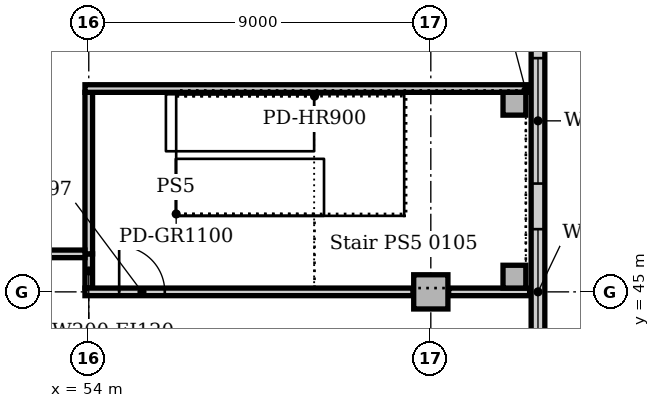
"""IFC4 building model, lengths in metres.
Left out: names, types, materials, properties, quantities, classifications, styles, units other than length and angle.
Written with IfcOpenShell. Run it as: python <this file> out.ifc"""

import sys

from ifc_helpers import new_model, si_unit, direction, frame, frame_2d, origin, origin_2d, place, context, subcontext, project, spatial, rectangle, extrude, element, fill, save


model = new_model("IFC4")
c1 = context("Model", 3, precision=1e-05, world=origin(), true_north=direction((0.0, 1.0)))
c2 = subcontext(c1, "Body", "Model", "MODEL_VIEW")
j1 = project(units=[si_unit("LENGTHUNIT", "METRE"), si_unit("PLANEANGLEUNIT", "RADIAN")], contexts=[c1])
p1 = place(None, origin())
s1 = spatial("IfcSite", under=j1, at=p1, CompositionType="ELEMENT")
p2 = place(p1, origin())
s2 = spatial("IfcBuilding", under=s1, at=p2, CompositionType="ELEMENT")
p3 = place(p2, frame((0.0, 0.0, 6.0)))
s3 = spatial("IfcBuildingStorey", under=s2, at=p3, CompositionType="ELEMENT", Elevation=6.0)
p4 = place(p3, frame((63.0, 45.0, 0.0), z_axis=(0.0, 0.0, 1.0), x_axis=(1.0, 0.0, 0.0)))
e1 = element("IfcColumn", 1, at=p4, inside=s3, PredefinedType="COLUMN", context=c2, shape_type="SweptSolid", body=[
    extrude(rectangle(XDim=0.9, YDim=0.9, at=origin_2d()), origin(), (0.0, 0.0, 1.0), 4.7),
])
p5 = place(p3, frame((65.82, -9.0, 0.0), z_axis=(0.0, 0.0, 1.0), x_axis=(0.0, 1.0, 0.0)))
e2 = element("IfcWall", 2, at=p5, inside=s3, PredefinedType="STANDARD", context=c2, shape_type="SweptSolid", body=[
    extrude(rectangle(XDim=63.0, YDim=0.36, at=frame_2d((31.5, 0.0))), origin(), (0.0, 0.0, 1.0), 4.7),
])
p6 = place(p5, frame((2.85, 0.0, 0.9)))
e3 = element("IfcOpeningElement", 3, at=p6, cuts=e2, PredefinedType="OPENING", context=c2, shape_type="SweptSolid", body=[
    extrude(rectangle(XDim=3.3, YDim=2.4, at=frame_2d((1.65, 1.2))), frame((0.0, 0.19, 0.0), z_axis=(0.0, -1.0, 0.0), x_axis=(1.0, 0.0, 0.0)), (0.0, 0.0, 1.0), 0.38),
])
p7 = place(p5, frame((7.35, 0.0, 0.9)))
e4 = element("IfcOpeningElement", 4, at=p7, cuts=e2, PredefinedType="OPENING", context=c2, shape_type="SweptSolid", body=[
    extrude(rectangle(XDim=3.3, YDim=2.4, at=frame_2d((1.65, 1.2))), frame((0.0, 0.19, 0.0), z_axis=(0.0, -1.0, 0.0), x_axis=(1.0, 0.0, 0.0)), (0.0, 0.0, 1.0), 0.38),
])
p8 = place(p5, frame((11.85, 0.0, 0.9)))
e5 = element("IfcOpeningElement", 5, at=p8, cuts=e2, PredefinedType="OPENING", context=c2, shape_type="SweptSolid", body=[
    extrude(rectangle(XDim=3.3, YDim=2.4, at=frame_2d((1.65, 1.2))), frame((0.0, 0.19, 0.0), z_axis=(0.0, -1.0, 0.0), x_axis=(1.0, 0.0, 0.0)), (0.0, 0.0, 1.0), 0.38),
])
p9 = place(p5, frame((16.35, 0.0, 0.9)))
e6 = element("IfcOpeningElement", 6, at=p9, cuts=e2, PredefinedType="OPENING", context=c2, shape_type="SweptSolid", body=[
    extrude(rectangle(XDim=3.3, YDim=2.4, at=frame_2d((1.65, 1.2))), frame((0.0, 0.19, 0.0), z_axis=(0.0, -1.0, 0.0), x_axis=(1.0, 0.0, 0.0)), (0.0, 0.0, 1.0), 0.38),
])
p10 = place(p5, frame((20.85, 0.0, 0.9)))
e7 = element("IfcOpeningElement", 7, at=p10, cuts=e2, PredefinedType="OPENING", context=c2, shape_type="SweptSolid", body=[
    extrude(rectangle(XDim=3.3, YDim=2.4, at=frame_2d((1.65, 1.2))), frame((0.0, 0.19, 0.0), z_axis=(0.0, -1.0, 0.0), x_axis=(1.0, 0.0, 0.0)), (0.0, 0.0, 1.0), 0.38),
])
p11 = place(p5, frame((25.35, 0.0, 0.9)))
e8 = element("IfcOpeningElement", 8, at=p11, cuts=e2, PredefinedType="OPENING", context=c2, shape_type="SweptSolid", body=[
    extrude(rectangle(XDim=3.3, YDim=2.4, at=frame_2d((1.65, 1.2))), frame((0.0, 0.19, 0.0), z_axis=(0.0, -1.0, 0.0), x_axis=(1.0, 0.0, 0.0)), (0.0, 0.0, 1.0), 0.38),
])
p12 = place(p5, frame((29.85, 0.0, 0.9)))
e9 = element("IfcOpeningElement", 9, at=p12, cuts=e2, PredefinedType="OPENING", context=c2, shape_type="SweptSolid", body=[
    extrude(rectangle(XDim=3.3, YDim=2.4, at=frame_2d((1.65, 1.2))), frame((0.0, 0.19, 0.0), z_axis=(0.0, -1.0, 0.0), x_axis=(1.0, 0.0, 0.0)), (0.0, 0.0, 1.0), 0.38),
])
p13 = place(p5, frame((34.35, 0.0, 0.9)))
e10 = element("IfcOpeningElement", 10, at=p13, cuts=e2, PredefinedType="OPENING", context=c2, shape_type="SweptSolid", body=[
    extrude(rectangle(XDim=3.3, YDim=2.4, at=frame_2d((1.65, 1.2))), frame((0.0, 0.19, 0.0), z_axis=(0.0, -1.0, 0.0), x_axis=(1.0, 0.0, 0.0)), (0.0, 0.0, 1.0), 0.38),
])
p14 = place(p5, frame((38.85, 0.0, 0.9)))
e11 = element("IfcOpeningElement", 11, at=p14, cuts=e2, PredefinedType="OPENING", context=c2, shape_type="SweptSolid", body=[
    extrude(rectangle(XDim=3.3, YDim=2.4, at=frame_2d((1.65, 1.2))), frame((0.0, 0.19, 0.0), z_axis=(0.0, -1.0, 0.0), x_axis=(1.0, 0.0, 0.0)), (0.0, 0.0, 1.0), 0.38),
])
p15 = place(p5, frame((43.35, 0.0, 0.9)))
e12 = element("IfcOpeningElement", 12, at=p15, cuts=e2, PredefinedType="OPENING", context=c2, shape_type="SweptSolid", body=[
    extrude(rectangle(XDim=3.3, YDim=2.4, at=frame_2d((1.65, 1.2))), frame((0.0, 0.19, 0.0), z_axis=(0.0, -1.0, 0.0), x_axis=(1.0, 0.0, 0.0)), (0.0, 0.0, 1.0), 0.38),
])
p16 = place(p5, frame((47.85, 0.0, 0.9)))
e13 = element("IfcOpeningElement", 13, at=p16, cuts=e2, PredefinedType="OPENING", context=c2, shape_type="SweptSolid", body=[
    extrude(rectangle(XDim=3.3, YDim=2.4, at=frame_2d((1.65, 1.2))), frame((0.0, 0.19, 0.0), z_axis=(0.0, -1.0, 0.0), x_axis=(1.0, 0.0, 0.0)), (0.0, 0.0, 1.0), 0.38),
])
p17 = place(p5, frame((52.35, 0.0, 0.9)))
e14 = element("IfcOpeningElement", 14, at=p17, cuts=e2, PredefinedType="OPENING", context=c2, shape_type="SweptSolid", body=[
    extrude(rectangle(XDim=3.3, YDim=2.4, at=frame_2d((1.65, 1.2))), frame((0.0, 0.19, 0.0), z_axis=(0.0, -1.0, 0.0), x_axis=(1.0, 0.0, 0.0)), (0.0, 0.0, 1.0), 0.38),
])
p18 = place(p5, frame((56.85, 0.0, 0.9)))
e15 = element("IfcOpeningElement", 15, at=p18, cuts=e2, PredefinedType="OPENING", context=c2, shape_type="SweptSolid", body=[
    extrude(rectangle(XDim=3.3, YDim=2.4, at=frame_2d((1.65, 1.2))), frame((0.0, 0.19, 0.0), z_axis=(0.0, -1.0, 0.0), x_axis=(1.0, 0.0, 0.0)), (0.0, 0.0, 1.0), 0.38),
])
for number, where, z_axis, x_axis in (
    (16, (65.2, 49.95, 0.0), (0.0, 0.0, 1.0), (1.0, 0.0, 0.0)),
    (17, (65.2, 45.4, 0.0), (0.0, 0.0, 1.0), (1.0, 0.0, 0.0)),
):
    element("IfcColumn", number, at=place(p3, frame(where, z_axis=z_axis, x_axis=x_axis)), inside=s3, PredefinedType="COLUMN", context=c2, shape_type="SweptSolid", body=[
        extrude(rectangle(XDim=0.6, YDim=0.6, at=origin_2d()), origin(), (0.0, 0.0, 1.0), 5.0),
    ])
p19 = place(p3, frame((54.0, 45.1, 0.0), z_axis=(0.0, 0.0, 1.0), x_axis=(0.0, 1.0, 0.0)))
e18 = element("IfcWall", 18, at=p19, inside=s3, PredefinedType="SOLIDWALL", context=c2, shape_type="SweptSolid", body=[
    extrude(rectangle(XDim=0.9, YDim=0.2, at=frame_2d((0.45, 0.0))), origin(), (0.0, 0.0, 1.0), 4.7),
])
p20 = place(p3, frame((53.9, 45.0, 0.0), z_axis=(0.0, 0.0, 1.0), x_axis=(1.0, 0.0, 0.0)))
e19 = element("IfcWall", 19, at=p20, inside=s3, PredefinedType="SOLIDWALL", context=c2, shape_type="SweptSolid", body=[
    extrude(rectangle(XDim=8.63, YDim=0.2, at=frame_2d((4.315, 0.0))), origin(), (0.0, 0.0, 1.0), 4.7),
])
p21 = place(p20, frame((0.9, 0.0, 0.0)))
e20 = element("IfcOpeningElement", 20, at=p21, cuts=e19, PredefinedType="OPENING", context=c2, shape_type="SweptSolid", body=[
    extrude(rectangle(XDim=1.2, YDim=2.1, at=frame_2d((0.6, 1.05))), frame((0.0, 0.11, 0.0), z_axis=(0.0, -1.0, 0.0), x_axis=(1.0, 0.0, 0.0)), (0.0, 0.0, 1.0), 0.22),
])
p22 = place(p3, frame((63.47, 45.0, 0.0), z_axis=(0.0, 0.0, 1.0), x_axis=(1.0, 0.0, 0.0)))
e21 = element("IfcWall", 21, at=p22, inside=s3, PredefinedType="SOLIDWALL", context=c2, shape_type="SweptSolid", body=[
    extrude(rectangle(XDim=2.13, YDim=0.2, at=frame_2d((1.065, 0.0))), origin(), (0.0, 0.0, 1.0), 4.7),
])
p23 = place(p3, frame((54.0, 46.0, 0.0), z_axis=(0.0, 0.0, 1.0), x_axis=(0.0, 1.0, 0.0)))
e22 = element("IfcWall", 22, at=p23, inside=s3, PredefinedType="SOLIDWALL", context=c2, shape_type="SweptSolid", body=[
    extrude(rectangle(XDim=4.25, YDim=0.2, at=frame_2d((2.125, 0.0))), origin(), (0.0, 0.0, 1.0), 4.7),
])
p24 = place(p3, frame((53.9, 50.35, 0.0), z_axis=(0.0, 0.0, 1.0), x_axis=(1.0, 0.0, 0.0)))
e23 = element("IfcWall", 23, at=p24, inside=s3, PredefinedType="SOLIDWALL", context=c2, shape_type="SweptSolid", body=[
    extrude(rectangle(XDim=11.7, YDim=0.2, at=frame_2d((5.85, 0.0))), origin(), (0.0, 0.0, 1.0), 4.7),
])
p25 = place(p3, frame((45.1, 46.0, 0.0), z_axis=(0.0, 0.0, 1.0), x_axis=(1.0, 0.0, 0.0)))
e24 = element("IfcWall", 24, at=p25, inside=s3, PredefinedType="PARTITIONING", context=c2, shape_type="SweptSolid", body=[
    extrude(rectangle(XDim=8.8, YDim=0.2, at=frame_2d((4.4, 0.0))), origin(), (0.0, 0.0, 1.0), 4.7),
])
p26 = place(p25, frame((3.5, 0.0, 0.0)))
e25 = element("IfcOpeningElement", 25, at=p26, cuts=e24, PredefinedType="OPENING", context=c2, shape_type="SweptSolid", body=[
    extrude(rectangle(XDim=1.8, YDim=2.1, at=frame_2d((0.9, 1.05))), frame((0.0, 0.11, 0.0), z_axis=(0.0, -1.0, 0.0), x_axis=(1.0, 0.0, 0.0)), (0.0, 0.0, 1.0), 0.22),
])
p27 = place(p17, origin())
e26 = element("IfcWindow", 26, at=p27, inside=s3, PartitioningType="SINGLE_PANEL", PredefinedType="WINDOW", context=c2, shape_type="SweptSolid", body=[
    extrude(rectangle(XDim=3.3, YDim=2.4, at=frame_2d((1.65, 1.2))), frame((0.0, 0.13, 0.0), z_axis=(0.0, -1.0, 0.0), x_axis=(1.0, 0.0, 0.0)), (0.0, 0.0, 1.0), 0.06),
])
fill(e14, e26)
p28 = place(p18, origin())
e27 = element("IfcWindow", 27, at=p28, inside=s3, PartitioningType="SINGLE_PANEL", PredefinedType="WINDOW", context=c2, shape_type="SweptSolid", body=[
    extrude(rectangle(XDim=3.3, YDim=2.4, at=frame_2d((1.65, 1.2))), frame((0.0, 0.13, 0.0), z_axis=(0.0, -1.0, 0.0), x_axis=(1.0, 0.0, 0.0)), (0.0, 0.0, 1.0), 0.06),
])
fill(e15, e27)
p29 = place(p21, origin())
e28 = element("IfcDoor", 28, at=p29, inside=s3, OperationType="SINGLE_SWING_LEFT", PredefinedType="DOOR", context=c2, shape_type="SweptSolid", body=[
    extrude(rectangle(XDim=1.2, YDim=2.1, at=frame_2d((0.6, 1.05))), frame((0.0, 0.025, 0.0), z_axis=(0.0, -1.0, 0.0), x_axis=(1.0, 0.0, 0.0)), (0.0, 0.0, 1.0), 0.05),
])
fill(e20, e28)
save(model, sys.argv[1])
